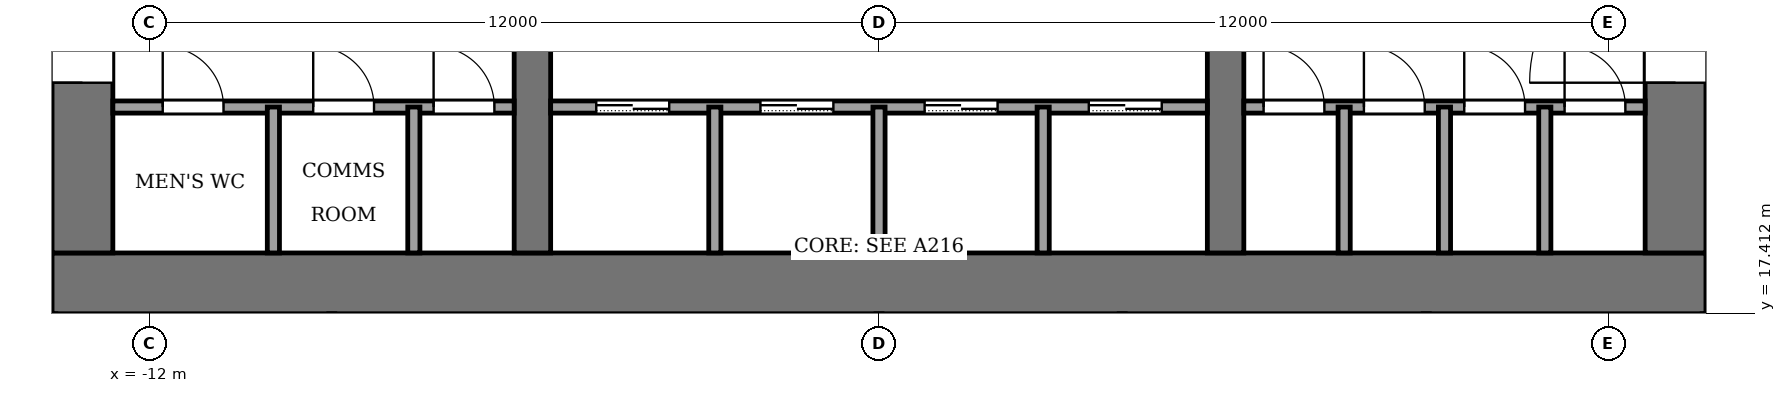
"""IFC4 building model, lengths in metres.
Left out: names, types, materials, properties, quantities, classifications, styles, units other than length and angle.
Written with IfcOpenShell. Run it as: python <this file> out.ifc"""

import sys

from ifc_helpers import new_model, si_unit, direction, frame, frame_2d, origin, place, context, subcontext, project, spatial, rectangle, extrude, element, fill, save


model = new_model("IFC4")
c1 = context("Model", 3, precision=1e-05, world=origin(), true_north=direction((0.0, 1.0)))
c2 = subcontext(c1, "Body", "Model", "MODEL_VIEW")
j1 = project(units=[si_unit("LENGTHUNIT", "METRE"), si_unit("PLANEANGLEUNIT", "RADIAN")], contexts=[c1])
p1 = place(None, origin())
s1 = spatial("IfcSite", under=j1, at=p1, CompositionType="ELEMENT")
p2 = place(p1, origin())
s2 = spatial("IfcBuilding", under=s1, at=p2, CompositionType="ELEMENT")
p3 = place(p2, frame((0.0, 0.0, 121.0)))
s3 = spatial("IfcBuildingStorey", under=s2, at=p3, CompositionType="ELEMENT", Elevation=121.0)
p4 = place(p3, frame((-13.6, 17.9, -0.13), z_axis=(0.0, 0.0, 1.0), x_axis=(1.0, 0.0, 0.0)))
e1 = element("IfcWall", 1, at=p4, inside=s3, PredefinedType="SHEAR", context=c2, shape_type="SweptSolid", body=[
    extrude(rectangle(XDim=27.2, YDim=1.0, at=frame_2d((13.6, 0.0))), origin(), (0.0, 0.0, 1.0), 5.0),
])
p5 = place(p3, frame((-13.1, 18.4, -0.13), z_axis=(0.0, 0.0, 1.0), x_axis=(0.0, 1.0, 0.0)))
e2 = element("IfcWall", 2, at=p5, inside=s3, PredefinedType="SHEAR", context=c2, shape_type="SweptSolid", body=[
    extrude(rectangle(XDim=19.2, YDim=1.0, at=frame_2d((9.6, 0.0))), origin(), (0.0, 0.0, 1.0), 5.0),
])
p6 = place(p5, frame((2.8, 0.0, 0.13)))
e3 = element("IfcOpeningElement", 3, at=p6, cuts=e2, PredefinedType="OPENING", context=c2, shape_type="SweptSolid", body=[
    extrude(rectangle(XDim=2.4, YDim=2.4, at=frame_2d((1.2, 1.2))), frame((0.0, 0.51, 0.0), z_axis=(0.0, -1.0, 0.0), x_axis=(1.0, 0.0, 0.0)), (0.0, 0.0, 1.0), 1.02),
])
p7 = place(p5, frame((13.4, 0.0, 0.13)))
e4 = element("IfcOpeningElement", 4, at=p7, cuts=e2, PredefinedType="OPENING", context=c2, shape_type="SweptSolid", body=[
    extrude(rectangle(XDim=1.4, YDim=2.2, at=frame_2d((0.7, 1.1))), frame((0.0, 0.51, 0.0), z_axis=(0.0, -1.0, 0.0), x_axis=(1.0, 0.0, 0.0)), (0.0, 0.0, 1.0), 1.02),
])
p8 = place(p3, frame((13.1, 18.4, -0.13), z_axis=(0.0, 0.0, 1.0), x_axis=(0.0, 1.0, 0.0)))
e5 = element("IfcWall", 5, at=p8, inside=s3, PredefinedType="SHEAR", context=c2, shape_type="SweptSolid", body=[
    extrude(rectangle(XDim=19.2, YDim=1.0, at=frame_2d((9.6, 0.0))), origin(), (0.0, 0.0, 1.0), 5.0),
])
p9 = place(p8, frame((2.8, 0.0, 0.13)))
e6 = element("IfcOpeningElement", 6, at=p9, cuts=e5, PredefinedType="OPENING", context=c2, shape_type="SweptSolid", body=[
    extrude(rectangle(XDim=2.4, YDim=2.4, at=frame_2d((1.2, 1.2))), frame((0.0, 0.51, 0.0), z_axis=(0.0, -1.0, 0.0), x_axis=(1.0, 0.0, 0.0)), (0.0, 0.0, 1.0), 1.02),
])
p10 = place(p8, frame((13.3, 0.0, 0.13)))
e7 = element("IfcOpeningElement", 7, at=p10, cuts=e5, PredefinedType="OPENING", context=c2, shape_type="SweptSolid", body=[
    extrude(rectangle(XDim=2.4, YDim=2.4, at=frame_2d((1.2, 1.2))), frame((0.0, 0.51, 0.0), z_axis=(0.0, -1.0, 0.0), x_axis=(1.0, 0.0, 0.0)), (0.0, 0.0, 1.0), 1.02),
])
p11 = place(p3, frame((-5.7, 18.4, -0.13), z_axis=(0.0, 0.0, 1.0), x_axis=(0.0, 1.0, 0.0)))
e8 = element("IfcWall", 8, at=p11, inside=s3, PredefinedType="SHEAR", context=c2, shape_type="SweptSolid", body=[
    extrude(rectangle(XDim=19.2, YDim=0.6, at=frame_2d((9.6, 0.0))), origin(), (0.0, 0.0, 1.0), 5.0),
])
p12 = place(p11, frame((8.35, 0.0, 0.13)))
e9 = element("IfcOpeningElement", 9, at=p12, cuts=e8, PredefinedType="OPENING", context=c2, shape_type="SweptSolid", body=[
    extrude(rectangle(XDim=0.9, YDim=2.1, at=frame_2d((0.45, 1.05))), frame((0.0, 0.31, 0.0), z_axis=(0.0, -1.0, 0.0), x_axis=(1.0, 0.0, 0.0)), (0.0, 0.0, 1.0), 0.62),
])
p13 = place(p3, frame((5.7, 18.4, -0.13), z_axis=(0.0, 0.0, 1.0), x_axis=(0.0, 1.0, 0.0)))
e10 = element("IfcWall", 10, at=p13, inside=s3, PredefinedType="SHEAR", context=c2, shape_type="SweptSolid", body=[
    extrude(rectangle(XDim=19.2, YDim=0.6, at=frame_2d((9.6, 0.0))), origin(), (0.0, 0.0, 1.0), 5.0),
])
p14 = place(p13, frame((13.3, 0.0, 0.13)))
e11 = element("IfcOpeningElement", 11, at=p14, cuts=e10, PredefinedType="OPENING", context=c2, shape_type="SweptSolid", body=[
    extrude(rectangle(XDim=2.4, YDim=2.4, at=frame_2d((1.2, 1.2))), frame((0.0, 0.31, 0.0), z_axis=(0.0, -1.0, 0.0), x_axis=(1.0, 0.0, 0.0)), (0.0, 0.0, 1.0), 0.62),
])
p15 = place(p3, frame((-12.6, 20.8, 0.0), z_axis=(0.0, 0.0, 1.0), x_axis=(1.0, 0.0, 0.0)))
e12 = element("IfcWall", 12, at=p15, inside=s3, PredefinedType="PARTITIONING", context=c2, shape_type="SweptSolid", body=[
    extrude(rectangle(XDim=6.6, YDim=0.2, at=frame_2d((3.3, 0.0))), origin(), (0.0, 0.0, 1.0), 4.87),
])
p16 = place(p15, frame((0.82, 0.0, 0.0)))
e13 = element("IfcOpeningElement", 13, at=p16, cuts=e12, PredefinedType="OPENING", context=c2, shape_type="SweptSolid", body=[
    extrude(rectangle(XDim=1.0, YDim=2.1, at=frame_2d((0.5, 1.05))), frame((0.0, 0.11, 0.0), z_axis=(0.0, -1.0, 0.0), x_axis=(1.0, 0.0, 0.0)), (0.0, 0.0, 1.0), 0.22),
])
p17 = place(p15, frame((3.295, 0.0, 0.0)))
e14 = element("IfcOpeningElement", 14, at=p17, cuts=e12, PredefinedType="OPENING", context=c2, shape_type="SweptSolid", body=[
    extrude(rectangle(XDim=1.0, YDim=2.1, at=frame_2d((0.5, 1.05))), frame((0.0, 0.11, 0.0), z_axis=(0.0, -1.0, 0.0), x_axis=(1.0, 0.0, 0.0)), (0.0, 0.0, 1.0), 0.22),
])
p18 = place(p15, frame((5.275, 0.0, 0.0)))
e15 = element("IfcOpeningElement", 15, at=p18, cuts=e12, PredefinedType="OPENING", context=c2, shape_type="SweptSolid", body=[
    extrude(rectangle(XDim=1.0, YDim=2.1, at=frame_2d((0.5, 1.05))), frame((0.0, 0.11, 0.0), z_axis=(0.0, -1.0, 0.0), x_axis=(1.0, 0.0, 0.0)), (0.0, 0.0, 1.0), 0.22),
])
p19 = place(p3, frame((-5.4, 20.8, 0.0), z_axis=(0.0, 0.0, 1.0), x_axis=(1.0, 0.0, 0.0)))
e16 = element("IfcWall", 16, at=p19, inside=s3, PredefinedType="PARTITIONING", context=c2, shape_type="SweptSolid", body=[
    extrude(rectangle(XDim=10.8, YDim=0.2, at=frame_2d((5.4, 0.0))), origin(), (0.0, 0.0, 1.0), 4.87),
])
p20 = place(p19, frame((0.75, 0.0, 0.0)))
e17 = element("IfcOpeningElement", 17, at=p20, cuts=e16, PredefinedType="OPENING", context=c2, shape_type="SweptSolid", body=[
    extrude(rectangle(XDim=1.2, YDim=2.2, at=frame_2d((0.6, 1.1))), frame((0.0, 0.11, 0.0), z_axis=(0.0, -1.0, 0.0), x_axis=(1.0, 0.0, 0.0)), (0.0, 0.0, 1.0), 0.22),
])
p21 = place(p19, frame((3.45, 0.0, 0.0)))
e18 = element("IfcOpeningElement", 18, at=p21, cuts=e16, PredefinedType="OPENING", context=c2, shape_type="SweptSolid", body=[
    extrude(rectangle(XDim=1.2, YDim=2.2, at=frame_2d((0.6, 1.1))), frame((0.0, 0.11, 0.0), z_axis=(0.0, -1.0, 0.0), x_axis=(1.0, 0.0, 0.0)), (0.0, 0.0, 1.0), 0.22),
])
p22 = place(p19, frame((6.15, 0.0, 0.0)))
e19 = element("IfcOpeningElement", 19, at=p22, cuts=e16, PredefinedType="OPENING", context=c2, shape_type="SweptSolid", body=[
    extrude(rectangle(XDim=1.2, YDim=2.2, at=frame_2d((0.6, 1.1))), frame((0.0, 0.11, 0.0), z_axis=(0.0, -1.0, 0.0), x_axis=(1.0, 0.0, 0.0)), (0.0, 0.0, 1.0), 0.22),
])
p23 = place(p19, frame((8.85, 0.0, 0.0)))
e20 = element("IfcOpeningElement", 20, at=p23, cuts=e16, PredefinedType="OPENING", context=c2, shape_type="SweptSolid", body=[
    extrude(rectangle(XDim=1.2, YDim=2.2, at=frame_2d((0.6, 1.1))), frame((0.0, 0.11, 0.0), z_axis=(0.0, -1.0, 0.0), x_axis=(1.0, 0.0, 0.0)), (0.0, 0.0, 1.0), 0.22),
])
p24 = place(p3, frame((6.0, 20.8, 0.0), z_axis=(0.0, 0.0, 1.0), x_axis=(1.0, 0.0, 0.0)))
e21 = element("IfcWall", 21, at=p24, inside=s3, PredefinedType="PARTITIONING", context=c2, shape_type="SweptSolid", body=[
    extrude(rectangle(XDim=6.6, YDim=0.2, at=frame_2d((3.3, 0.0))), origin(), (0.0, 0.0, 1.0), 4.87),
])
p25 = place(p24, frame((0.325, 0.0, 0.0)))
e22 = element("IfcOpeningElement", 22, at=p25, cuts=e21, PredefinedType="OPENING", context=c2, shape_type="SweptSolid", body=[
    extrude(rectangle(XDim=1.0, YDim=2.1, at=frame_2d((0.5, 1.05))), frame((0.0, 0.11, 0.0), z_axis=(0.0, -1.0, 0.0), x_axis=(1.0, 0.0, 0.0)), (0.0, 0.0, 1.0), 0.22),
])
p26 = place(p24, frame((1.975, 0.0, 0.0)))
e23 = element("IfcOpeningElement", 23, at=p26, cuts=e21, PredefinedType="OPENING", context=c2, shape_type="SweptSolid", body=[
    extrude(rectangle(XDim=1.0, YDim=2.1, at=frame_2d((0.5, 1.05))), frame((0.0, 0.11, 0.0), z_axis=(0.0, -1.0, 0.0), x_axis=(1.0, 0.0, 0.0)), (0.0, 0.0, 1.0), 0.22),
])
p27 = place(p24, frame((3.625, 0.0, 0.0)))
e24 = element("IfcOpeningElement", 24, at=p27, cuts=e21, PredefinedType="OPENING", context=c2, shape_type="SweptSolid", body=[
    extrude(rectangle(XDim=1.0, YDim=2.1, at=frame_2d((0.5, 1.05))), frame((0.0, 0.11, 0.0), z_axis=(0.0, -1.0, 0.0), x_axis=(1.0, 0.0, 0.0)), (0.0, 0.0, 1.0), 0.22),
])
p28 = place(p24, frame((5.275, 0.0, 0.0)))
e25 = element("IfcOpeningElement", 25, at=p28, cuts=e21, PredefinedType="OPENING", context=c2, shape_type="SweptSolid", body=[
    extrude(rectangle(XDim=1.0, YDim=2.1, at=frame_2d((0.5, 1.05))), frame((0.0, 0.11, 0.0), z_axis=(0.0, -1.0, 0.0), x_axis=(1.0, 0.0, 0.0)), (0.0, 0.0, 1.0), 0.22),
])
for number, where, z_axis, x_axis in (
    (26, (-9.96, 18.4, 0.0), (0.0, 0.0, 1.0), (0.0, 1.0, 0.0)),
    (27, (-7.65, 18.4, 0.0), (0.0, 0.0, 1.0), (0.0, 1.0, 0.0)),
    (28, (-2.7, 18.4, 0.0), (0.0, 0.0, 1.0), (0.0, 1.0, 0.0)),
    (29, (0.0, 18.4, 0.0), (0.0, 0.0, 1.0), (0.0, 1.0, 0.0)),
    (30, (2.7, 18.4, 0.0), (0.0, 0.0, 1.0), (0.0, 1.0, 0.0)),
    (31, (7.65, 18.4, 0.0), (0.0, 0.0, 1.0), (0.0, 1.0, 0.0)),
    (32, (9.3, 18.4, 0.0), (0.0, 0.0, 1.0), (0.0, 1.0, 0.0)),
    (33, (10.95, 18.4, 0.0), (0.0, 0.0, 1.0), (0.0, 1.0, 0.0)),
):
    element("IfcWall", number, at=place(p3, frame(where, z_axis=z_axis, x_axis=x_axis)), inside=s3, PredefinedType="PARTITIONING", context=c2, shape_type="SweptSolid", body=[
        extrude(rectangle(XDim=2.4, YDim=0.2, at=frame_2d((1.2, 0.0))), origin(), (0.0, 0.0, 1.0), 4.87),
    ])
p29 = place(p3, frame((4.0, 10.087, 0.0), z_axis=(0.0, 0.0, 1.0), x_axis=(0.0, 1.0, 0.0)))
e34 = element("IfcWall", 34, at=p29, inside=s3, PredefinedType="PARTITIONING", context=c2, shape_type="SweptSolid", body=[
    extrude(rectangle(XDim=7.313, YDim=0.1, at=frame_2d((3.657, 0.0))), origin(), (0.0, 0.0, 1.0), 4.04),
])
p30 = place(p29, frame((3.222, 0.0, 0.0)))
e35 = element("IfcOpeningElement", 35, at=p30, cuts=e34, PredefinedType="OPENING", context=c2, shape_type="SweptSolid", body=[
    extrude(rectangle(XDim=1.0, YDim=2.1, at=frame_2d((0.5, 1.05))), frame((0.0, 0.06, 0.0), z_axis=(0.0, -1.0, 0.0), x_axis=(1.0, 0.0, 0.0)), (0.0, 0.0, 1.0), 0.12),
])
p31 = place(p20, origin())
e36 = element("IfcDoor", 36, at=p31, inside=s3, OperationType="SLIDING_TO_LEFT", PredefinedType="DOOR", context=c2, shape_type="SweptSolid", body=[
    extrude(rectangle(XDim=1.2, YDim=2.2, at=frame_2d((0.6, 1.1))), frame((0.0, 0.025, 0.0), z_axis=(0.0, -1.0, 0.0), x_axis=(1.0, 0.0, 0.0)), (0.0, 0.0, 1.0), 0.05),
])
fill(e17, e36)
p32 = place(p21, origin())
e37 = element("IfcDoor", 37, at=p32, inside=s3, OperationType="SLIDING_TO_LEFT", PredefinedType="DOOR", context=c2, shape_type="SweptSolid", body=[
    extrude(rectangle(XDim=1.2, YDim=2.2, at=frame_2d((0.6, 1.1))), frame((0.0, 0.025, 0.0), z_axis=(0.0, -1.0, 0.0), x_axis=(1.0, 0.0, 0.0)), (0.0, 0.0, 1.0), 0.05),
])
fill(e18, e37)
p33 = place(p22, origin())
e38 = element("IfcDoor", 38, at=p33, inside=s3, OperationType="SLIDING_TO_LEFT", PredefinedType="DOOR", context=c2, shape_type="SweptSolid", body=[
    extrude(rectangle(XDim=1.2, YDim=2.2, at=frame_2d((0.6, 1.1))), frame((0.0, 0.025, 0.0), z_axis=(0.0, -1.0, 0.0), x_axis=(1.0, 0.0, 0.0)), (0.0, 0.0, 1.0), 0.05),
])
fill(e19, e38)
p34 = place(p23, origin())
e39 = element("IfcDoor", 39, at=p34, inside=s3, OperationType="SLIDING_TO_LEFT", PredefinedType="DOOR", context=c2, shape_type="SweptSolid", body=[
    extrude(rectangle(XDim=1.2, YDim=2.2, at=frame_2d((0.6, 1.1))), frame((0.0, 0.025, 0.0), z_axis=(0.0, -1.0, 0.0), x_axis=(1.0, 0.0, 0.0)), (0.0, 0.0, 1.0), 0.05),
])
fill(e20, e39)
p35 = place(p16, origin())
e40 = element("IfcDoor", 40, at=p35, inside=s3, OperationType="SINGLE_SWING_LEFT", PredefinedType="DOOR", context=c2, shape_type="SweptSolid", body=[
    extrude(rectangle(XDim=1.0, YDim=2.1, at=frame_2d((0.5, 1.05))), frame((0.0, 0.025, 0.0), z_axis=(0.0, -1.0, 0.0), x_axis=(1.0, 0.0, 0.0)), (0.0, 0.0, 1.0), 0.05),
])
fill(e13, e40)
p36 = place(p17, origin())
e41 = element("IfcDoor", 41, at=p36, inside=s3, OperationType="SINGLE_SWING_LEFT", PredefinedType="DOOR", context=c2, shape_type="SweptSolid", body=[
    extrude(rectangle(XDim=1.0, YDim=2.1, at=frame_2d((0.5, 1.05))), frame((0.0, 0.025, 0.0), z_axis=(0.0, -1.0, 0.0), x_axis=(1.0, 0.0, 0.0)), (0.0, 0.0, 1.0), 0.05),
])
fill(e14, e41)
p37 = place(p18, origin())
e42 = element("IfcDoor", 42, at=p37, inside=s3, OperationType="SINGLE_SWING_RIGHT", PredefinedType="DOOR", context=c2, shape_type="SweptSolid", body=[
    extrude(rectangle(XDim=1.0, YDim=2.1, at=frame_2d((0.5, 1.05))), frame((0.0, 0.025, 0.0), z_axis=(0.0, -1.0, 0.0), x_axis=(1.0, 0.0, 0.0)), (0.0, 0.0, 1.0), 0.05),
])
fill(e15, e42)
p38 = place(p25, origin())
e43 = element("IfcDoor", 43, at=p38, inside=s3, OperationType="SINGLE_SWING_LEFT", PredefinedType="DOOR", context=c2, shape_type="SweptSolid", body=[
    extrude(rectangle(XDim=1.0, YDim=2.1, at=frame_2d((0.5, 1.05))), frame((0.0, 0.025, 0.0), z_axis=(0.0, -1.0, 0.0), x_axis=(1.0, 0.0, 0.0)), (0.0, 0.0, 1.0), 0.05),
])
fill(e22, e43)
p39 = place(p26, origin())
e44 = element("IfcDoor", 44, at=p39, inside=s3, OperationType="SINGLE_SWING_LEFT", PredefinedType="DOOR", context=c2, shape_type="SweptSolid", body=[
    extrude(rectangle(XDim=1.0, YDim=2.1, at=frame_2d((0.5, 1.05))), frame((0.0, 0.025, 0.0), z_axis=(0.0, -1.0, 0.0), x_axis=(1.0, 0.0, 0.0)), (0.0, 0.0, 1.0), 0.05),
])
fill(e23, e44)
p40 = place(p27, origin())
e45 = element("IfcDoor", 45, at=p40, inside=s3, OperationType="SINGLE_SWING_RIGHT", PredefinedType="DOOR", context=c2, shape_type="SweptSolid", body=[
    extrude(rectangle(XDim=1.0, YDim=2.1, at=frame_2d((0.5, 1.05))), frame((0.0, 0.025, 0.0), z_axis=(0.0, -1.0, 0.0), x_axis=(1.0, 0.0, 0.0)), (0.0, 0.0, 1.0), 0.05),
])
fill(e24, e45)
p41 = place(p28, origin())
e46 = element("IfcDoor", 46, at=p41, inside=s3, OperationType="SINGLE_SWING_RIGHT", PredefinedType="DOOR", context=c2, shape_type="SweptSolid", body=[
    extrude(rectangle(XDim=1.0, YDim=2.1, at=frame_2d((0.5, 1.05))), frame((0.0, 0.025, 0.0), z_axis=(0.0, -1.0, 0.0), x_axis=(1.0, 0.0, 0.0)), (0.0, 0.0, 1.0), 0.05),
])
fill(e25, e46)
p42 = place(p6, origin())
e47 = element("IfcDoor", 47, at=p42, inside=s3, OperationType="DOUBLE_DOOR_SINGLE_SWING", PredefinedType="DOOR", context=c2, shape_type="SweptSolid", body=[
    extrude(rectangle(XDim=2.4, YDim=2.4, at=frame_2d((1.2, 1.2))), frame((0.0, 0.025, 0.0), z_axis=(0.0, -1.0, 0.0), x_axis=(1.0, 0.0, 0.0)), (0.0, 0.0, 1.0), 0.05),
])
fill(e3, e47)
p43 = place(p9, origin())
e48 = element("IfcDoor", 48, at=p43, inside=s3, OperationType="DOUBLE_DOOR_SINGLE_SWING", PredefinedType="DOOR", context=c2, shape_type="SweptSolid", body=[
    extrude(rectangle(XDim=2.4, YDim=2.4, at=frame_2d((1.2, 1.2))), frame((0.0, 0.025, 0.0), z_axis=(0.0, -1.0, 0.0), x_axis=(1.0, 0.0, 0.0)), (0.0, 0.0, 1.0), 0.05),
])
fill(e6, e48)
save(model, sys.argv[1])
